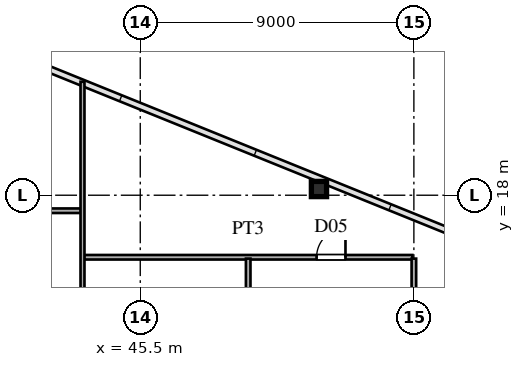
"""IFC4 building model, lengths in metres.
Left out: names, types, materials, properties, quantities, classifications, styles, units other than length and angle.
Written with IfcOpenShell. Run it as: python <this file> out.ifc"""

import sys

from ifc_helpers import new_model, si_unit, direction, frame, frame_2d, origin, origin_2d, place, context, subcontext, project, spatial, rectangle, hollow_rectangle, extrude, source, transform, mapped, element, fill, save


model = new_model("IFC4")
c1 = context("Model", 3, precision=1e-05, world=origin(), true_north=direction((0.0, 1.0)))
c2 = subcontext(c1, "Body", "Model", "MODEL_VIEW")
j1 = project(units=[si_unit("LENGTHUNIT", "METRE"), si_unit("PLANEANGLEUNIT", "RADIAN")], contexts=[c1])
p1 = place(None, origin())
s1 = spatial("IfcSite", under=j1, at=p1, CompositionType="ELEMENT")
p2 = place(p1, origin())
s2 = spatial("IfcBuilding", under=s1, at=p2, CompositionType="ELEMENT")
p3 = place(p2, frame((0.0, 0.0, 22.5)))
s3 = spatial("IfcBuildingStorey", under=s2, at=p3, CompositionType="ELEMENT", Elevation=22.5)
m1 = source(origin(), c2, "Body", "SweptSolid", [
    extrude(hollow_rectangle(XDim=0.5, YDim=0.5, WallThickness=0.02, at=origin_2d()), origin(), (0.0, 0.0, 1.0), 3.6),
])
p4 = place(p3, frame((51.378, 18.204, 0.0), z_axis=(0.0, 0.0, 1.0), x_axis=(1.0, 0.0, 0.0)))
e1 = element("IfcColumn", 1, at=p4, inside=s3, PredefinedType="COLUMN", context=c2, shape_type="MappedRepresentation", body=[
    mapped(m1, transform((0.0, 0.0, 0.0), scale=1.0)),
])
p5 = place(p3, frame((43.65, 15.96, 0.0), z_axis=(0.0, 0.0, 1.0), x_axis=(1.0, 0.0, 0.0)))
e2 = element("IfcWall", 2, at=p5, inside=s3, PredefinedType="PARTITIONING", context=c2, shape_type="SweptSolid", body=[
    extrude(rectangle(XDim=10.8, YDim=0.15, at=frame_2d((5.4, 0.0))), origin(), (0.0, 0.0, 1.0), 3.38),
])
p6 = place(p5, frame((7.65, 0.0, 0.0)))
e3 = element("IfcOpeningElement", 3, at=p6, cuts=e2, PredefinedType="OPENING", context=c2, shape_type="SweptSolid", body=[
    extrude(rectangle(XDim=0.95, YDim=2.15, at=frame_2d((0.475, 1.075))), frame((0.0, 0.085, 0.0), z_axis=(0.0, -1.0, 0.0), x_axis=(1.0, 0.0, 0.0)), (0.0, 0.0, 1.0), 0.17),
])
p7 = place(p3, frame((39.45, 17.49, 0.0), z_axis=(0.0, 0.0, 1.0), x_axis=(1.0, 0.0, 0.0)))
e4 = element("IfcWall", 4, at=p7, inside=s3, PredefinedType="PARTITIONING", context=c2, shape_type="SweptSolid", body=[
    extrude(rectangle(XDim=4.1, YDim=0.15, at=frame_2d((2.05, 0.0))), origin(), (0.0, 0.0, 1.0), 3.38),
])
p8 = place(p3, frame((43.6, 0.352, 0.0), z_axis=(0.0, 0.0, 1.0), x_axis=(0.0, 1.0, 0.0)))
e5 = element("IfcWall", 5, at=p8, inside=s3, PredefinedType="PARTITIONING", context=c2, shape_type="SweptSolid", body=[
    extrude(rectangle(XDim=21.381, YDim=0.13, at=frame_2d((10.69, 0.0))), origin(), (0.0, 0.0, 1.0), 3.38),
])
p9 = place(p8, frame((8.578, 0.0, 0.0)))
e6 = element("IfcOpeningElement", 6, at=p9, cuts=e5, PredefinedType="OPENING", context=c2, shape_type="SweptSolid", body=[
    extrude(rectangle(XDim=0.95, YDim=2.15, at=frame_2d((0.475, 1.075))), frame((0.0, 0.075, 0.0), z_axis=(0.0, -1.0, 0.0), x_axis=(1.0, 0.0, 0.0)), (0.0, 0.0, 1.0), 0.15),
])
p10 = place(p8, frame((10.078, 0.0, 0.0)))
e7 = element("IfcOpeningElement", 7, at=p10, cuts=e5, PredefinedType="OPENING", context=c2, shape_type="SweptSolid", body=[
    extrude(rectangle(XDim=0.95, YDim=2.15, at=frame_2d((0.475, 1.075))), frame((0.0, 0.075, 0.0), z_axis=(0.0, -1.0, 0.0), x_axis=(1.0, 0.0, 0.0)), (0.0, 0.0, 1.0), 0.15),
])
p11 = place(p3, frame((49.05, 4.55, 0.0), z_axis=(0.0, 0.0, 1.0), x_axis=(0.0, 1.0, 0.0)))
e8 = element("IfcWall", 8, at=p11, inside=s3, PredefinedType="PARTITIONING", context=c2, shape_type="SweptSolid", body=[
    extrude(rectangle(XDim=11.365, YDim=0.15, at=frame_2d((5.683, 0.0))), origin(), (0.0, 0.0, 1.0), 3.38),
])
p12 = place(p11, frame((2.341, 0.0, 0.0)))
e9 = element("IfcOpeningElement", 9, at=p12, cuts=e8, PredefinedType="OPENING", context=c2, shape_type="SweptSolid", body=[
    extrude(rectangle(XDim=0.95, YDim=2.15, at=frame_2d((0.475, 1.075))), frame((0.0, 0.085, 0.0), z_axis=(0.0, -1.0, 0.0), x_axis=(1.0, 0.0, 0.0)), (0.0, 0.0, 1.0), 0.17),
])
p13 = place(p3, frame((54.5, -17.321, 0.0), z_axis=(0.0, 0.0, 1.0), x_axis=(0.0, 1.0, 0.0)))
e10 = element("IfcWall", 10, at=p13, inside=s3, PredefinedType="PARTITIONING", context=c2, shape_type="SweptSolid", body=[
    extrude(rectangle(XDim=33.236, YDim=0.15, at=frame_2d((16.618, 0.0))), origin(), (0.0, 0.0, 1.0), 2.68),
])
p14 = place(p13, frame((1.42, 0.0, 0.0)))
e11 = element("IfcOpeningElement", 11, at=p14, cuts=e10, PredefinedType="OPENING", context=c2, shape_type="SweptSolid", body=[
    extrude(rectangle(XDim=0.95, YDim=2.15, at=frame_2d((0.475, 1.075))), frame((0.0, 0.085, 0.0), z_axis=(0.0, -1.0, 0.0), x_axis=(1.0, 0.0, 0.0)), (0.0, 0.0, 1.0), 0.17),
])
p15 = place(p13, frame((5.313, 0.0, 0.0)))
e12 = element("IfcOpeningElement", 12, at=p15, cuts=e10, PredefinedType="OPENING", context=c2, shape_type="SweptSolid", body=[
    extrude(rectangle(XDim=0.95, YDim=2.15, at=frame_2d((0.475, 1.075))), frame((0.0, 0.085, 0.0), z_axis=(0.0, -1.0, 0.0), x_axis=(1.0, 0.0, 0.0)), (0.0, 0.0, 1.0), 0.17),
])
p16 = place(p13, frame((14.346, 0.0, 0.0)))
e13 = element("IfcOpeningElement", 13, at=p16, cuts=e10, PredefinedType="OPENING", context=c2, shape_type="SweptSolid", body=[
    extrude(rectangle(XDim=0.95, YDim=2.15, at=frame_2d((0.475, 1.075))), frame((0.0, 0.085, 0.0), z_axis=(0.0, -1.0, 0.0), x_axis=(1.0, 0.0, 0.0)), (0.0, 0.0, 1.0), 0.17),
])
p17 = place(p13, frame((24.212, 0.0, 0.0)))
e14 = element("IfcOpeningElement", 14, at=p17, cuts=e10, PredefinedType="OPENING", context=c2, shape_type="SweptSolid", body=[
    extrude(rectangle(XDim=0.95, YDim=2.15, at=frame_2d((0.475, 1.075))), frame((0.0, 0.085, 0.0), z_axis=(0.0, -1.0, 0.0), x_axis=(1.0, 0.0, 0.0)), (0.0, 0.0, 1.0), 0.17),
])
m2 = source(origin(), c2, "Body", "SweptSolid", [
    extrude(rectangle(XDim=0.95, YDim=2.15, at=frame_2d((0.475, 1.075))), frame((0.0, 0.025, 0.0), z_axis=(0.0, -1.0, 0.0), x_axis=(1.0, 0.0, 0.0)), (0.0, 0.0, 1.0), 0.05),
])
p18 = place(p6, origin())
e15 = element("IfcDoor", 15, at=p18, inside=s3, OperationType="SINGLE_SWING_RIGHT", PredefinedType="DOOR", context=c2, shape_type="MappedRepresentation", body=[
    mapped(m2, transform((0.0, 0.0, 0.0), scale=1.0)),
])
fill(e3, e15)
save(model, sys.argv[1])
